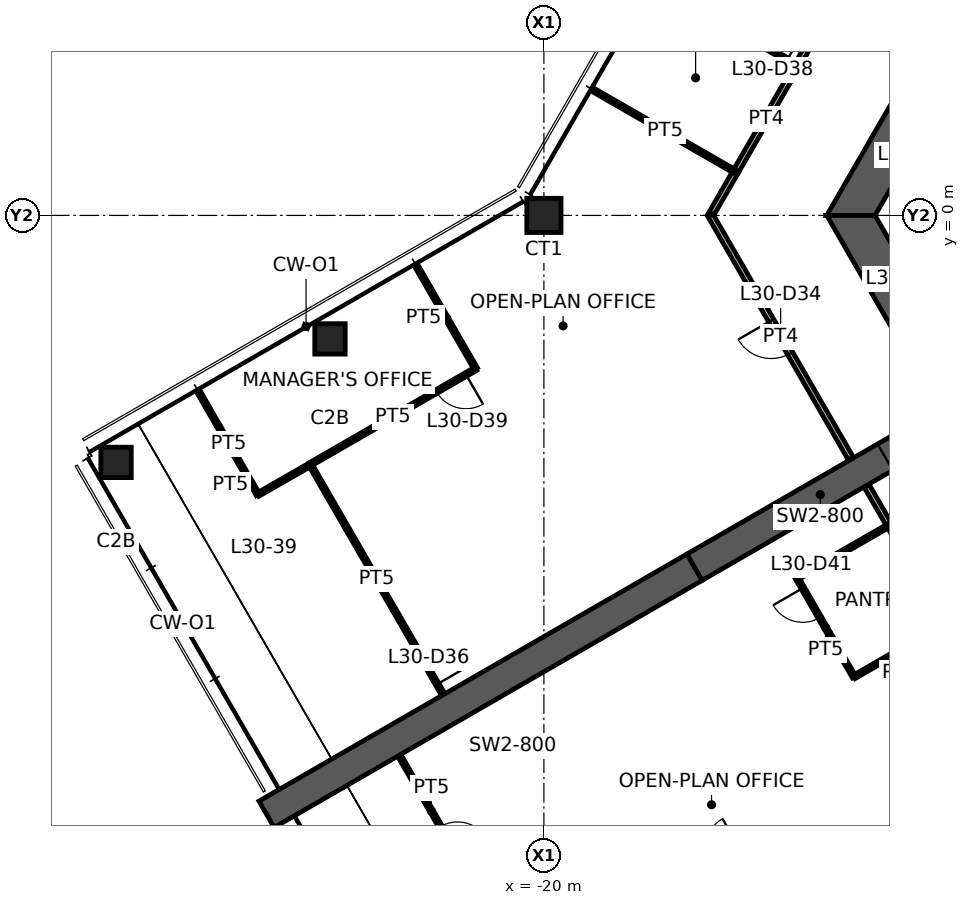
"""IFC4 building model, lengths in metres.
Left out: names, types, materials, properties, quantities, classifications, styles, units other than length and angle.
Written with IfcOpenShell. Run it as: python <this file> out.ifc"""

import sys

from ifc_helpers import new_model, si_unit, direction, frame, frame_2d, origin, origin_2d, place, context, subcontext, project, spatial, polyline, rectangle, hollow_rectangle, outline, extrude, element, fill, save


model = new_model("IFC4")
c1 = context("Model", 3, precision=1e-05, world=origin(), true_north=direction((0.0, 1.0)))
c2 = subcontext(c1, "Body", "Model", "MODEL_VIEW")
j1 = project(units=[si_unit("LENGTHUNIT", "METRE"), si_unit("PLANEANGLEUNIT", "RADIAN")], contexts=[c1])
p1 = place(None, origin())
s1 = spatial("IfcSite", under=j1, at=p1, CompositionType="ELEMENT")
p2 = place(p1, origin())
s2 = spatial("IfcBuilding", under=s1, at=p2, CompositionType="ELEMENT")
p3 = place(p2, frame((0.0, 0.0, 119.7)))
s3 = spatial("IfcBuildingStorey", under=s2, at=p3, CompositionType="ELEMENT", Elevation=119.7)
p4 = place(p3, frame((-20.0, 0.0, 0.0), z_axis=(0.0, 0.0, 1.0), x_axis=(1.0, 0.0, 0.0)))
e1 = element("IfcColumn", 1, at=p4, inside=s3, PredefinedType="COLUMN", context=c2, shape_type="SweptSolid", body=[
    extrude(hollow_rectangle(XDim=0.9, YDim=0.9, WallThickness=0.07, at=origin_2d()), origin(), (0.0, 0.0, 1.0), 3.9),
])
for number, where, z_axis, x_axis in (
    (2, (-25.629, -3.25, 0.0), (0.0, 0.0, 1.0), (1.0, 0.0, 0.0)),
    (3, (-31.258, -6.5, 0.0), (0.0, 0.0, 1.0), (1.0, 0.0, 0.0)),
):
    element("IfcColumn", number, at=place(p3, frame(where, z_axis=z_axis, x_axis=x_axis)), inside=s3, PredefinedType="COLUMN", context=c2, shape_type="SweptSolid", body=[
        extrude(hollow_rectangle(XDim=0.8, YDim=0.8, WallThickness=0.045, at=origin_2d()), origin(), (0.0, 0.0, 1.0), 3.9),
    ])
p5 = place(p3, frame((-5.961, 10.325, 0.0), z_axis=(0.0, 0.0, 1.0), x_axis=(-0.500004296715, -0.866022923061, 0.0)))
e4 = element("IfcWall", 4, at=p5, inside=s3, PredefinedType="SHEAR", context=c2, shape_type="SweptSolid", body=[
    extrude(outline(polyline([(-0.318, -0.55), (4.494, -0.55), (5.494, -0.55), (12.24, -0.55), (11.605, 0.55), (5.494, 0.55), (4.494, 0.55), (0.318, 0.55), (-0.318, -0.55)])), origin(), (0.0, 0.0, 1.0), 3.9),
])
p6 = place(p5, frame((4.494, 0.0, 0.0)))
e5 = element("IfcOpeningElement", 5, at=p6, cuts=e4, PredefinedType="OPENING", context=c2, shape_type="SweptSolid", body=[
    extrude(rectangle(XDim=1.0, YDim=2.1, at=frame_2d((0.5, 1.05))), frame((0.0, 0.56, 0.0), z_axis=(0.0, -1.0, 0.0), x_axis=(1.0, 0.0, 0.0)), (0.0, 0.0, 1.0), 1.12),
])
p7 = place(p3, frame((-11.922, 0.0, 0.0), z_axis=(0.0, 0.0, 1.0), x_axis=(0.500004296715, -0.866022923061, 0.0)))
e6 = element("IfcWall", 6, at=p7, inside=s3, PredefinedType="SHEAR", context=c2, shape_type="SweptSolid", body=[
    extrude(outline(polyline([(-0.318, -0.55), (6.381, -0.55), (7.181, -0.55), (12.24, -0.55), (11.605, 0.55), (7.181, 0.55), (6.381, 0.55), (0.318, 0.55), (-0.318, -0.55)])), origin(), (0.0, 0.0, 1.0), 3.9),
])
p8 = place(p7, frame((6.381, 0.0, 0.0)))
e7 = element("IfcOpeningElement", 7, at=p8, cuts=e6, PredefinedType="OPENING", context=c2, shape_type="SweptSolid", body=[
    extrude(rectangle(XDim=0.8, YDim=2.1, at=frame_2d((0.4, 1.05))), frame((0.0, 0.56, 0.0), z_axis=(0.0, -1.0, 0.0), x_axis=(1.0, 0.0, 0.0)), (0.0, 0.0, 1.0), 1.12),
])
p9 = place(p3, frame((-9.418, -5.438, 0.0), z_axis=(0.0, 0.0, 1.0), x_axis=(-0.866029782078, -0.499992416496, 0.0)))
e8 = element("IfcWall", 8, at=p9, inside=s3, PredefinedType="SHEAR", context=c2, shape_type="SweptSolid", body=[
    extrude(rectangle(XDim=7.646, YDim=0.8, at=frame_2d((3.823, 0.0))), origin(), (0.0, 0.0, 1.0), 3.9),
])
p10 = place(p9, frame((0.85, 0.0, 0.0)))
e9 = element("IfcOpeningElement", 9, at=p10, cuts=e8, PredefinedType="OPENING", context=c2, shape_type="SweptSolid", body=[
    extrude(rectangle(XDim=1.0, YDim=2.1, at=frame_2d((0.5, 1.05))), frame((0.0, 0.41, 0.0), z_axis=(0.0, -1.0, 0.0), x_axis=(1.0, 0.0, 0.0)), (0.0, 0.0, 1.0), 0.82),
])
p11 = place(p3, frame((-16.039, -9.26, 0.0), z_axis=(0.0, 0.0, 1.0), x_axis=(-0.866024837091, -0.50000098154, 0.0)))
e10 = element("IfcWall", 10, at=p11, inside=s3, PredefinedType="SHEAR", context=c2, shape_type="SweptSolid", body=[
    extrude(rectangle(XDim=13.0, YDim=0.8, at=frame_2d((6.5, 0.0))), origin(), (0.0, 0.0, 1.0), 3.9),
])
p12 = place(p3, frame((-14.962, 1.135, 0.0), z_axis=(0.0, 0.0, 1.0), x_axis=(0.500001520505, 0.866024525919, 0.0)))
e11 = element("IfcWall", 11, at=p12, inside=s3, PredefinedType="PARTITIONING", context=c2, shape_type="SweptSolid", body=[
    extrude(rectangle(XDim=3.256, YDim=0.15, at=frame_2d((1.628, 0.0))), origin(), (0.0, 0.0, 1.0), 2.35),
])
p13 = place(p3, frame((-15.617, 0.0, 0.0), z_axis=(0.0, 0.0, 1.0), x_axis=(0.499898558967, 0.866083962871, 0.0)))
e12 = element("IfcWall", 12, at=p13, inside=s3, PredefinedType="PARTITIONING", context=c2, shape_type="SweptSolid", body=[
    extrude(rectangle(XDim=1.32, YDim=0.15, at=frame_2d((0.66, 0.0))), origin(), (0.0, 0.0, 1.0), 2.35),
])
p14 = place(p3, frame((-11.923, -6.399, 0.0), z_axis=(0.0, 0.0, 1.0), x_axis=(-0.499980837837, 0.866036466782, 0.0)))
e13 = element("IfcWall", 13, at=p14, inside=s3, PredefinedType="PARTITIONING", context=c2, shape_type="SweptSolid", body=[
    extrude(rectangle(XDim=7.388, YDim=0.15, at=frame_2d((3.694, 0.0))), origin(), (0.0, 0.0, 1.0), 2.35),
])
p15 = place(p14, frame((3.194, 0.0, 0.0)))
e14 = element("IfcOpeningElement", 14, at=p15, cuts=e13, PredefinedType="OPENING", context=c2, shape_type="SweptSolid", body=[
    extrude(rectangle(XDim=1.0, YDim=2.1, at=frame_2d((0.5, 1.05))), frame((0.0, 0.085, 0.0), z_axis=(0.0, -1.0, 0.0), x_axis=(1.0, 0.0, 0.0)), (0.0, 0.0, 1.0), 0.17),
])
p16 = place(p3, frame((-13.338, 3.947, 0.0), z_axis=(0.0, 0.0, 1.0), x_axis=(0.49998791073, 0.866032383415, 0.0)))
e15 = element("IfcWall", 15, at=p16, inside=s3, PredefinedType="PARTITIONING", context=c2, shape_type="SweptSolid", body=[
    extrude(rectangle(XDim=6.502, YDim=0.15, at=frame_2d((3.251, 0.0))), origin(), (0.0, 0.0, 1.0), 2.35),
])
p17 = place(p16, frame((2.751, 0.0, 0.0)))
e16 = element("IfcOpeningElement", 16, at=p17, cuts=e15, PredefinedType="OPENING", context=c2, shape_type="SweptSolid", body=[
    extrude(rectangle(XDim=1.0, YDim=2.1, at=frame_2d((0.5, 1.05))), frame((0.0, 0.085, 0.0), z_axis=(0.0, -1.0, 0.0), x_axis=(1.0, 0.0, 0.0)), (0.0, 0.0, 1.0), 0.17),
])
p18 = place(p3, frame((-29.065, -4.68, 0.0), z_axis=(0.0, 0.0, 1.0), x_axis=(0.500120427123, -0.865955863987, 0.0)))
e17 = element("IfcWall", 17, at=p18, inside=s3, PredefinedType="PARTITIONING", context=c2, shape_type="SweptSolid", body=[
    extrude(rectangle(XDim=3.08, YDim=0.1, at=frame_2d((1.54, 0.0))), origin(), (0.0, 0.0, 1.0), 2.35),
])
p19 = place(p3, frame((-27.525, -7.347, 0.0), z_axis=(0.0, 0.0, 1.0), x_axis=(0.867571917523, 0.497311741191, 0.0)))
e18 = element("IfcWall", 18, at=p19, inside=s3, PredefinedType="PARTITIONING", context=c2, shape_type="SweptSolid", body=[
    extrude(rectangle(XDim=1.591, YDim=0.1, at=frame_2d((0.795, 0.0))), origin(), (0.0, 0.0, 1.0), 2.35),
])
p20 = place(p3, frame((-26.151, -6.554, 0.0), z_axis=(0.0, 0.0, 1.0), x_axis=(0.500528756763, -0.865719910625, 0.0)))
e19 = element("IfcWall", 19, at=p20, inside=s3, PredefinedType="PARTITIONING", context=c2, shape_type="SweptSolid", body=[
    extrude(rectangle(XDim=6.979, YDim=0.1, at=frame_2d((3.49, 0.0))), origin(), (0.0, 0.0, 1.0), 2.35),
])
p21 = place(p20, frame((5.78, 0.0, 0.0)))
e20 = element("IfcOpeningElement", 20, at=p21, cuts=e19, PredefinedType="OPENING", context=c2, shape_type="SweptSolid", body=[
    extrude(rectangle(XDim=0.9, YDim=2.1, at=frame_2d((0.45, 1.05))), frame((0.0, 0.06, 0.0), z_axis=(0.0, -1.0, 0.0), x_axis=(1.0, 0.0, 0.0)), (0.0, 0.0, 1.0), 0.12),
])
p22 = place(p3, frame((-14.957, 1.143, 0.0), z_axis=(0.0, 0.0, 1.0), x_axis=(-0.86652666665, 0.499130780441, 0.0)))
e21 = element("IfcWall", 21, at=p22, inside=s3, PredefinedType="PARTITIONING", context=c2, shape_type="SweptSolid", body=[
    extrude(rectangle(XDim=4.275, YDim=0.1, at=frame_2d((2.138, 0.0))), origin(), (0.0, 0.0, 1.0), 2.35),
])
p23 = place(p3, frame((-17.056, 6.099, 0.0), z_axis=(0.0, 0.0, 1.0), x_axis=(0.865505397626, -0.500899597405, 0.0)))
e22 = element("IfcWall", 22, at=p23, inside=s3, PredefinedType="PARTITIONING", context=c2, shape_type="SweptSolid", body=[
    extrude(rectangle(XDim=4.295, YDim=0.1, at=frame_2d((2.148, 0.0))), origin(), (0.0, 0.0, 1.0), 2.35),
])
p24 = place(p23, frame((3.095, 0.0, 0.0)))
e23 = element("IfcOpeningElement", 23, at=p24, cuts=e22, PredefinedType="OPENING", context=c2, shape_type="SweptSolid", body=[
    extrude(rectangle(XDim=0.9, YDim=2.1, at=frame_2d((0.45, 1.05))), frame((0.0, 0.06, 0.0), z_axis=(0.0, -1.0, 0.0), x_axis=(1.0, 0.0, 0.0)), (0.0, 0.0, 1.0), 0.12),
])
p25 = place(p3, frame((-23.332, -1.37, 0.0), z_axis=(0.0, 0.0, 1.0), x_axis=(0.499992328818, -0.866029832698, 0.0)))
e24 = element("IfcWall", 24, at=p25, inside=s3, PredefinedType="PARTITIONING", context=c2, shape_type="SweptSolid", body=[
    extrude(rectangle(XDim=3.08, YDim=0.1, at=frame_2d((1.54, 0.0))), origin(), (0.0, 0.0, 1.0), 2.35),
])
p26 = place(p3, frame((-21.792, -4.037, 0.0), z_axis=(0.0, 0.0, 1.0), x_axis=(-0.866037775365, -0.499978571182, 0.0)))
e25 = element("IfcWall", 25, at=p26, inside=s3, PredefinedType="PARTITIONING", context=c2, shape_type="SweptSolid", body=[
    extrude(rectangle(XDim=5.033, YDim=0.1, at=frame_2d((2.517, 0.0))), origin(), (0.0, 0.0, 1.0), 2.35),
])
p27 = place(p26, frame((0.3, 0.0, 0.0)))
e26 = element("IfcOpeningElement", 26, at=p27, cuts=e25, PredefinedType="OPENING", context=c2, shape_type="SweptSolid", body=[
    extrude(rectangle(XDim=0.9, YDim=2.1, at=frame_2d((0.45, 1.05))), frame((0.0, 0.06, 0.0), z_axis=(0.0, -1.0, 0.0), x_axis=(1.0, 0.0, 0.0)), (0.0, 0.0, 1.0), 0.12),
])
p28 = place(p3, frame((-9.41, -10.75, 0.0), z_axis=(0.0, 0.0, 1.0), x_axis=(-0.500038395149, 0.8660032352, 0.0)))
e27 = element("IfcWall", 27, at=p28, inside=s3, PredefinedType="PARTITIONING", context=c2, shape_type="SweptSolid", body=[
    extrude(rectangle(XDim=3.01, YDim=0.15, at=frame_2d((1.505, 0.0))), origin(), (0.0, 0.0, 1.0), 2.35),
])
p29 = place(p3, frame((-10.911, -8.152, 0.0), z_axis=(0.0, 0.0, 1.0), x_axis=(-0.499841408252, 0.866116947413, 0.0)))
e28 = element("IfcWall", 28, at=p29, inside=s3, PredefinedType="PARTITIONING", context=c2, shape_type="SweptSolid", body=[
    extrude(rectangle(XDim=1.185, YDim=0.15, at=frame_2d((0.592, 0.0))), origin(), (0.0, 0.0, 1.0), 2.35),
])
p30 = place(p3, frame((-13.338, -9.548, 0.0), z_axis=(0.0, 0.0, 1.0), x_axis=(0.866833758708, 0.498597267105, 0.0)))
e29 = element("IfcWall", 29, at=p30, inside=s3, PredefinedType="PARTITIONING", context=c2, shape_type="SweptSolid", body=[
    extrude(rectangle(XDim=2.8, YDim=0.1, at=frame_2d((1.4, 0.0))), origin(), (0.0, 0.0, 1.0), 2.35),
])
p31 = place(p3, frame((-11.838, -12.146, 0.0), z_axis=(0.0, 0.0, 1.0), x_axis=(-0.499990139034, 0.866031096941, 0.0)))
e30 = element("IfcWall", 30, at=p31, inside=s3, PredefinedType="PARTITIONING", context=c2, shape_type="SweptSolid", body=[
    extrude(rectangle(XDim=3.0, YDim=0.1, at=frame_2d((1.5, 0.0))), origin(), (0.0, 0.0, 1.0), 2.35),
])
p32 = place(p31, frame((1.8, 0.0, 0.0)))
e31 = element("IfcOpeningElement", 31, at=p32, cuts=e30, PredefinedType="OPENING", context=c2, shape_type="SweptSolid", body=[
    extrude(rectangle(XDim=0.9, YDim=2.1, at=frame_2d((0.45, 1.05))), frame((0.0, 0.06, 0.0), z_axis=(0.0, -1.0, 0.0), x_axis=(1.0, 0.0, 0.0)), (0.0, 0.0, 1.0), 0.12),
])
p33 = place(p3, frame((-9.415, -10.742, 0.0), z_axis=(0.0, 0.0, 1.0), x_axis=(-0.865195372903, -0.501434907746, 0.0)))
e32 = element("IfcWall", 32, at=p33, inside=s3, PredefinedType="PARTITIONING", context=c2, shape_type="SweptSolid", body=[
    extrude(rectangle(XDim=2.8, YDim=0.1, at=frame_2d((1.4, 0.0))), origin(), (0.0, 0.0, 1.0), 2.35),
])
p34 = place(p3, frame((-23.797, -14.224, 0.0), z_axis=(0.0, 0.0, 1.0), x_axis=(0.500015043844, -0.866016718043, 0.0)))
e33 = element("IfcWall", 33, at=p34, inside=s3, PredefinedType="PARTITIONING", context=c2, shape_type="SweptSolid", body=[
    extrude(rectangle(XDim=3.347, YDim=0.1, at=frame_2d((1.673, 0.0))), origin(), (0.0, 0.0, 1.0), 2.35),
])
p35 = place(p34, frame((2.147, 0.0, 0.0)))
e34 = element("IfcOpeningElement", 34, at=p35, cuts=e33, PredefinedType="OPENING", context=c2, shape_type="SweptSolid", body=[
    extrude(rectangle(XDim=0.9, YDim=2.1, at=frame_2d((0.45, 1.05))), frame((0.0, 0.06, 0.0), z_axis=(0.0, -1.0, 0.0), x_axis=(1.0, 0.0, 0.0)), (0.0, 0.0, 1.0), 0.12),
])
p36 = place(p10, origin())
e35 = element("IfcDoor", 35, at=p36, inside=s3, OperationType="SINGLE_SWING_LEFT", PredefinedType="DOOR", context=c2, shape_type="SweptSolid", body=[
    extrude(rectangle(XDim=1.0, YDim=2.1, at=frame_2d((0.5, 1.05))), frame((0.0, 0.025, 0.0), z_axis=(0.0, -1.0, 0.0), x_axis=(1.0, 0.0, 0.0)), (0.0, 0.0, 1.0), 0.05),
])
fill(e9, e35)
p37 = place(p15, origin())
e36 = element("IfcDoor", 36, at=p37, inside=s3, OperationType="SINGLE_SWING_RIGHT", PredefinedType="DOOR", context=c2, shape_type="SweptSolid", body=[
    extrude(rectangle(XDim=1.0, YDim=2.1, at=frame_2d((0.5, 1.05))), frame((0.0, 0.025, 0.0), z_axis=(0.0, -1.0, 0.0), x_axis=(1.0, 0.0, 0.0)), (0.0, 0.0, 1.0), 0.05),
])
fill(e14, e36)
p38 = place(p21, origin())
e37 = element("IfcDoor", 37, at=p38, inside=s3, OperationType="SINGLE_SWING_RIGHT", PredefinedType="DOOR", context=c2, shape_type="SweptSolid", body=[
    extrude(rectangle(XDim=0.9, YDim=2.1, at=frame_2d((0.45, 1.05))), frame((0.0, 0.025, 0.0), z_axis=(0.0, -1.0, 0.0), x_axis=(1.0, 0.0, 0.0)), (0.0, 0.0, 1.0), 0.05),
])
fill(e20, e37)
p39 = place(p24, origin())
e38 = element("IfcDoor", 38, at=p39, inside=s3, OperationType="SINGLE_SWING_RIGHT", PredefinedType="DOOR", context=c2, shape_type="SweptSolid", body=[
    extrude(rectangle(XDim=0.9, YDim=2.1, at=frame_2d((0.45, 1.05))), frame((0.0, 0.025, 0.0), z_axis=(0.0, -1.0, 0.0), x_axis=(1.0, 0.0, 0.0)), (0.0, 0.0, 1.0), 0.05),
])
fill(e23, e38)
p40 = place(p27, origin())
e39 = element("IfcDoor", 39, at=p40, inside=s3, OperationType="SINGLE_SWING_LEFT", PredefinedType="DOOR", context=c2, shape_type="SweptSolid", body=[
    extrude(rectangle(XDim=0.9, YDim=2.1, at=frame_2d((0.45, 1.05))), frame((0.0, 0.025, 0.0), z_axis=(0.0, -1.0, 0.0), x_axis=(1.0, 0.0, 0.0)), (0.0, 0.0, 1.0), 0.05),
])
fill(e26, e39)
p41 = place(p32, origin())
e40 = element("IfcDoor", 40, at=p41, inside=s3, OperationType="SINGLE_SWING_RIGHT", PredefinedType="DOOR", context=c2, shape_type="SweptSolid", body=[
    extrude(rectangle(XDim=0.9, YDim=2.1, at=frame_2d((0.45, 1.05))), frame((0.0, 0.025, 0.0), z_axis=(0.0, -1.0, 0.0), x_axis=(1.0, 0.0, 0.0)), (0.0, 0.0, 1.0), 0.05),
])
fill(e31, e40)
save(model, sys.argv[1])
